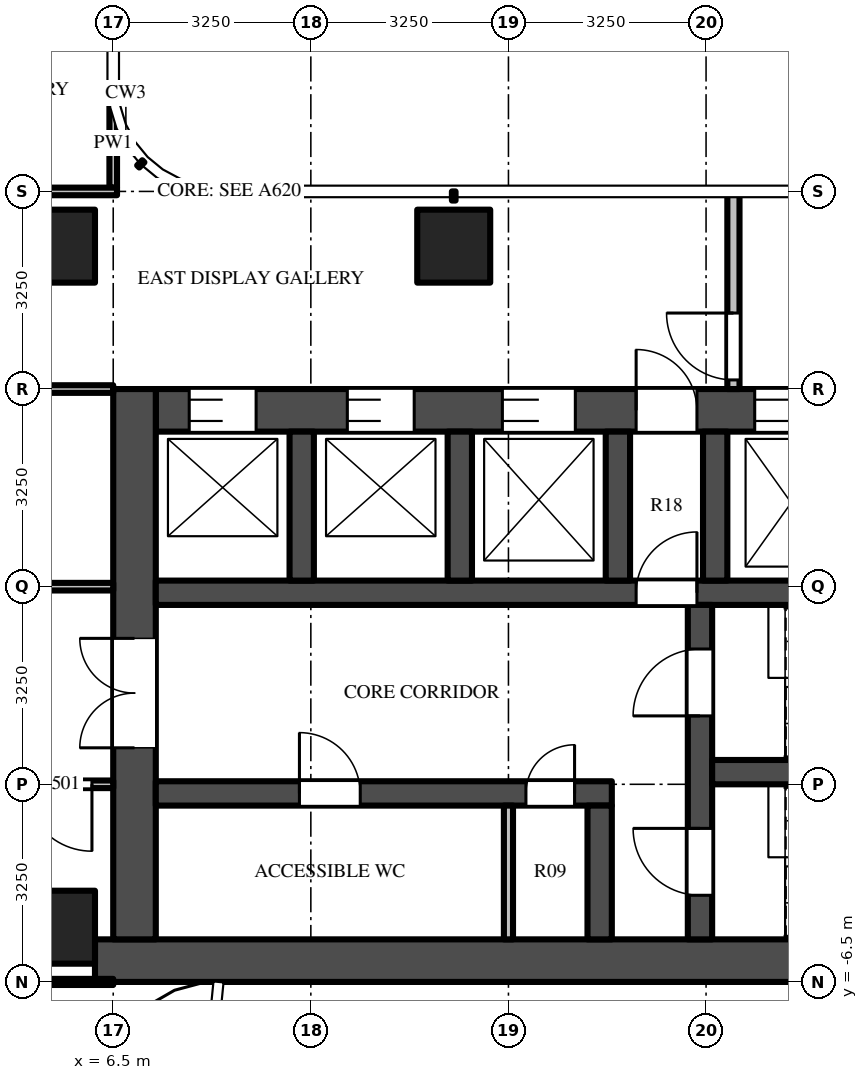
"""IFC4 building model, lengths in metres.
Left out: names, types, materials, properties, quantities, classifications, styles, units other than length and angle.
Written with IfcOpenShell. Run it as: python <this file> out.ifc"""

import sys

from ifc_helpers import new_model, si_unit, direction, frame, frame_2d, origin, origin_2d, place, context, subcontext, project, spatial, rectangle, extrude, source, transform, mapped, element, fill, save


model = new_model("IFC4")
c1 = context("Model", 3, precision=1e-05, world=origin(), true_north=direction((0.0, 1.0)))
c2 = subcontext(c1, "Body", "Model", "MODEL_VIEW")
j1 = project(units=[si_unit("LENGTHUNIT", "METRE"), si_unit("PLANEANGLEUNIT", "RADIAN")], contexts=[c1])
p1 = place(None, origin())
s1 = spatial("IfcSite", under=j1, at=p1, CompositionType="ELEMENT")
p2 = place(p1, origin())
s2 = spatial("IfcBuilding", under=s1, at=p2, CompositionType="ELEMENT")
p3 = place(p2, frame((0.0, 0.0, 165.9)))
s3 = spatial("IfcBuildingStorey", under=s2, at=p3, CompositionType="ELEMENT", Elevation=165.9)
m1 = source(origin(), c2, "Body", "SweptSolid", [
    extrude(rectangle(XDim=1.2, YDim=1.2, at=origin_2d()), origin(), (0.0, 0.0, 1.0), 3.9),
])
for number, where, z_axis, x_axis in (
    (1, (12.1, 5.6, 0.0), (0.0, 0.0, 1.0), (1.0, 0.0, 0.0)),
    (2, (5.6, 5.6, 0.0), (0.0, 0.0, 1.0), (1.0, 0.0, 0.0)),
    (3, (5.6, -5.6, 0.0), (0.0, 0.0, 1.0), (1.0, 0.0, 0.0)),
):
    element("IfcColumn", number, at=place(p3, frame(where, z_axis=z_axis, x_axis=x_axis)), inside=s3, PredefinedType="COLUMN", context=c2, shape_type="MappedRepresentation", body=[
        mapped(m1, transform((0.0, 0.0, 0.0))),
    ])
m2 = source(origin(), c2, "Body", "SweptSolid", [
    extrude(rectangle(XDim=16.55, YDim=0.7, at=frame_2d((8.275, 0.0))), origin(), (0.0, 0.0, 1.0), 3.7),
])
p4 = place(p3, frame((6.2, -6.15, 0.0), z_axis=(0.0, 0.0, 1.0), x_axis=(1.0, 0.0, 0.0)))
e4 = element("IfcWall", 4, at=p4, inside=s3, PredefinedType="SHEAR", context=c2, shape_type="MappedRepresentation", body=[
    mapped(m2, transform((0.0, 0.0, 0.0))),
])
m3 = source(origin(), c2, "Body", "SweptSolid", [
    extrude(rectangle(XDim=14.85, YDim=0.7, at=frame_2d((7.425, 0.0))), origin(), (0.0, 0.0, 1.0), 3.7),
])
p5 = place(p3, frame((7.2, 2.9, 0.0), z_axis=(0.0, 0.0, 1.0), x_axis=(1.0, 0.0, 0.0)))
e5 = element("IfcWall", 5, at=p5, inside=s3, PredefinedType="SHEAR", context=c2, shape_type="MappedRepresentation", body=[
    mapped(m3, transform((0.0, 0.0, 0.0))),
])
m4 = source(origin(), c2, "Body", "SweptSolid", [
    extrude(rectangle(XDim=1.1, YDim=2.1, at=frame_2d((0.55, 1.05))), frame((0.0, 0.36, 0.0), z_axis=(0.0, -1.0, 0.0), x_axis=(1.0, 0.0, 0.0)), (0.0, 0.0, 1.0), 0.72),
])
p6 = place(p5, frame((0.55, 0.0, 0.0)))
e6 = element("IfcOpeningElement", 6, at=p6, cuts=e5, PredefinedType="OPENING", context=c2, shape_type="MappedRepresentation", body=[
    mapped(m4, transform((0.0, 0.0, 0.0))),
])
p7 = place(p5, frame((3.15, 0.0, 0.0)))
e7 = element("IfcOpeningElement", 7, at=p7, cuts=e5, PredefinedType="OPENING", context=c2, shape_type="MappedRepresentation", body=[
    mapped(m4, transform((0.0, 0.0, 0.0))),
])
m5 = source(origin(), c2, "Body", "SweptSolid", [
    extrude(rectangle(XDim=1.2, YDim=2.1, at=frame_2d((0.6, 1.05))), frame((0.0, 0.36, 0.0), z_axis=(0.0, -1.0, 0.0), x_axis=(1.0, 0.0, 0.0)), (0.0, 0.0, 1.0), 0.72),
])
p8 = place(p5, frame((5.7, 0.0, 0.0)))
e8 = element("IfcOpeningElement", 8, at=p8, cuts=e5, PredefinedType="OPENING", context=c2, shape_type="MappedRepresentation", body=[
    mapped(m5, transform((0.0, 0.0, 0.0))),
])
m6 = source(origin(), c2, "Body", "SweptSolid", [
    extrude(rectangle(XDim=1.3, YDim=2.1, at=frame_2d((0.65, 1.05))), frame((0.0, 0.36, 0.0), z_axis=(0.0, -1.0, 0.0), x_axis=(1.0, 0.0, 0.0)), (0.0, 0.0, 1.0), 0.72),
])
p9 = place(p5, frame((12.2, 0.0, 0.0)))
e9 = element("IfcOpeningElement", 9, at=p9, cuts=e5, PredefinedType="OPENING", context=c2, shape_type="MappedRepresentation", body=[
    mapped(m6, transform((0.0, 0.0, 0.0))),
])
p10 = place(p5, frame((9.85, 0.0, 0.0)))
e10 = element("IfcOpeningElement", 10, at=p10, cuts=e5, PredefinedType="OPENING", context=c2, shape_type="MappedRepresentation", body=[
    mapped(m5, transform((0.0, 0.0, 0.0))),
])
m7 = source(origin(), c2, "Body", "SweptSolid", [
    extrude(rectangle(XDim=1.0, YDim=2.1, at=frame_2d((0.5, 1.05))), frame((0.0, 0.36, 0.0), z_axis=(0.0, -1.0, 0.0), x_axis=(1.0, 0.0, 0.0)), (0.0, 0.0, 1.0), 0.72),
])
p11 = place(p5, frame((7.9, 0.0, 0.0)))
e11 = element("IfcOpeningElement", 11, at=p11, cuts=e5, PredefinedType="OPENING", context=c2, shape_type="MappedRepresentation", body=[
    mapped(m7, transform((0.0, 0.0, 0.0))),
])
m8 = source(origin(), c2, "Body", "SweptSolid", [
    extrude(rectangle(XDim=9.05, YDim=0.7, at=frame_2d((4.525, 0.0))), origin(), (0.0, 0.0, 1.0), 3.7),
])
p12 = place(p3, frame((6.85, -5.8, 0.0), z_axis=(0.0, 0.0, 1.0), x_axis=(0.0, 1.0, 0.0)))
e12 = element("IfcWall", 12, at=p12, inside=s3, PredefinedType="SHEAR", context=c2, shape_type="MappedRepresentation", body=[
    mapped(m8, transform((0.0, 0.0, 0.0))),
])
m9 = source(origin(), c2, "Body", "SweptSolid", [
    extrude(rectangle(XDim=1.8, YDim=2.1, at=frame_2d((0.9, 1.05))), frame((0.0, 0.36, 0.0), z_axis=(0.0, -1.0, 0.0), x_axis=(1.0, 0.0, 0.0)), (0.0, 0.0, 1.0), 0.72),
])
p13 = place(p12, frame((3.15, 0.0, 0.0)))
e13 = element("IfcOpeningElement", 13, at=p13, cuts=e12, PredefinedType="OPENING", context=c2, shape_type="MappedRepresentation", body=[
    mapped(m9, transform((0.0, 0.0, 0.0))),
])
m10 = source(origin(), c2, "Body", "SweptSolid", [
    extrude(rectangle(XDim=7.5, YDim=0.4, at=frame_2d((3.75, 0.0))), origin(), (0.0, 0.0, 1.0), 3.7),
])
p14 = place(p3, frame((7.2, -3.4, 0.0), z_axis=(0.0, 0.0, 1.0), x_axis=(1.0, 0.0, 0.0)))
e14 = element("IfcWall", 14, at=p14, inside=s3, PredefinedType="SHEAR", context=c2, shape_type="MappedRepresentation", body=[
    mapped(m10, transform((0.0, 0.0, 0.0))),
])
m11 = source(origin(), c2, "Body", "SweptSolid", [
    extrude(rectangle(XDim=1.0, YDim=2.1, at=frame_2d((0.5, 1.05))), frame((0.0, 0.21, 0.0), z_axis=(0.0, -1.0, 0.0), x_axis=(1.0, 0.0, 0.0)), (0.0, 0.0, 1.0), 0.42),
])
p15 = place(p14, frame((2.363, 0.0, 0.0)))
e15 = element("IfcOpeningElement", 15, at=p15, cuts=e14, PredefinedType="OPENING", context=c2, shape_type="MappedRepresentation", body=[
    mapped(m11, transform((0.0, 0.0, 0.0))),
])
m12 = source(origin(), c2, "Body", "SweptSolid", [
    extrude(rectangle(XDim=0.8, YDim=2.1, at=frame_2d((0.4, 1.05))), frame((0.0, 0.21, 0.0), z_axis=(0.0, -1.0, 0.0), x_axis=(1.0, 0.0, 0.0)), (0.0, 0.0, 1.0), 0.42),
])
p16 = place(p14, frame((6.087, 0.0, 0.0)))
e16 = element("IfcOpeningElement", 16, at=p16, cuts=e14, PredefinedType="OPENING", context=c2, shape_type="MappedRepresentation", body=[
    mapped(m12, transform((0.0, 0.0, 0.0))),
])
m13 = source(origin(), c2, "Body", "SweptSolid", [
    extrude(rectangle(XDim=14.85, YDim=0.4, at=frame_2d((7.425, 0.0))), origin(), (0.0, 0.0, 1.0), 3.7),
])
p17 = place(p3, frame((7.2, -0.1, 0.0), z_axis=(0.0, 0.0, 1.0), x_axis=(1.0, 0.0, 0.0)))
e17 = element("IfcWall", 17, at=p17, inside=s3, PredefinedType="SHEAR", context=c2, shape_type="MappedRepresentation", body=[
    mapped(m13, transform((0.0, 0.0, 0.0))),
])
p18 = place(p17, frame((7.9, 0.0, 0.0)))
e18 = element("IfcOpeningElement", 18, at=p18, cuts=e17, PredefinedType="OPENING", context=c2, shape_type="MappedRepresentation", body=[
    mapped(m11, transform((0.0, 0.0, 0.0))),
])
m14 = source(origin(), c2, "Body", "SweptSolid", [
    extrude(rectangle(XDim=5.5, YDim=0.4, at=frame_2d((2.75, 0.0))), origin(), (0.0, 0.0, 1.0), 3.7),
])
p19 = place(p3, frame((16.15, -5.8, 0.0), z_axis=(0.0, 0.0, 1.0), x_axis=(0.0, 1.0, 0.0)))
e19 = element("IfcWall", 19, at=p19, inside=s3, PredefinedType="SHEAR", context=c2, shape_type="MappedRepresentation", body=[
    mapped(m14, transform((0.0, 0.0, 0.0))),
])
m15 = source(origin(), c2, "Body", "SweptSolid", [
    extrude(rectangle(XDim=1.1, YDim=2.1, at=frame_2d((0.55, 1.05))), frame((0.0, 0.21, 0.0), z_axis=(0.0, -1.0, 0.0), x_axis=(1.0, 0.0, 0.0)), (0.0, 0.0, 1.0), 0.42),
])
p20 = place(p19, frame((0.725, 0.0, 0.0)))
e20 = element("IfcOpeningElement", 20, at=p20, cuts=e19, PredefinedType="OPENING", context=c2, shape_type="MappedRepresentation", body=[
    mapped(m15, transform((0.0, 0.0, 0.0))),
])
p21 = place(p19, frame((3.675, 0.0, 0.0)))
e21 = element("IfcOpeningElement", 21, at=p21, cuts=e19, PredefinedType="OPENING", context=c2, shape_type="MappedRepresentation", body=[
    mapped(m15, transform((0.0, 0.0, 0.0))),
])
m16 = source(origin(), c2, "Body", "SweptSolid", [
    extrude(rectangle(XDim=5.7, YDim=0.4, at=frame_2d((2.85, 0.0))), origin(), (0.0, 0.0, 1.0), 3.7),
])
p22 = place(p3, frame((16.35, -3.05, 0.0), z_axis=(0.0, 0.0, 1.0), x_axis=(1.0, 0.0, 0.0)))
e22 = element("IfcWall", 22, at=p22, inside=s3, PredefinedType="SHEAR", context=c2, shape_type="MappedRepresentation", body=[
    mapped(m16, transform((0.0, 0.0, 0.0))),
])
m17 = source(origin(), c2, "Body", "SweptSolid", [
    extrude(rectangle(XDim=2.2, YDim=0.4, at=frame_2d((1.1, 0.0))), origin(), (0.0, 0.0, 1.0), 3.7),
])
p23 = place(p3, frame((14.5, -5.8, 0.0), z_axis=(0.0, 0.0, 1.0), x_axis=(0.0, 1.0, 0.0)))
e23 = element("IfcWall", 23, at=p23, inside=s3, PredefinedType="SHEAR", context=c2, shape_type="MappedRepresentation", body=[
    mapped(m17, transform((0.0, 0.0, 0.0))),
])
m18 = source(origin(), c2, "Body", "SweptSolid", [
    extrude(rectangle(XDim=2.45, YDim=0.4, at=frame_2d((1.225, 0.0))), origin(), (0.0, 0.0, 1.0), 3.7),
])
for number, where, z_axis, x_axis in (
    (24, (9.6, 0.1, 0.0), (0.0, 0.0, 1.0), (0.0, 1.0, 0.0)),
    (25, (12.2, 0.1, 0.0), (0.0, 0.0, 1.0), (0.0, 1.0, 0.0)),
    (26, (14.8, 0.1, 0.0), (0.0, 0.0, 1.0), (0.0, 1.0, 0.0)),
    (27, (16.4, 0.1, 0.0), (0.0, 0.0, 1.0), (0.0, 1.0, 0.0)),
):
    element("IfcWall", number, at=place(p3, frame(where, z_axis=z_axis, x_axis=x_axis)), inside=s3, PredefinedType="SHEAR", context=c2, shape_type="MappedRepresentation", body=[
        mapped(m18, transform((0.0, 0.0, 0.0))),
    ])
m19 = source(origin(), c2, "Body", "SweptSolid", [
    extrude(rectangle(XDim=3.25, YDim=0.2, at=frame_2d((1.625, 0.0))), origin(), (0.0, 0.0, 1.0), 3.7),
])
p24 = place(p3, frame((16.7, 3.25, 0.0), z_axis=(0.0, 0.0, 1.0), x_axis=(0.0, 1.0, 0.0)))
e28 = element("IfcWall", 28, at=p24, inside=s3, PredefinedType="PARTITIONING", context=c2, shape_type="MappedRepresentation", body=[
    mapped(m19, transform((0.0, 0.0, 0.0))),
])
m20 = source(origin(), c2, "Body", "SweptSolid", [
    extrude(rectangle(XDim=1.1, YDim=2.1, at=frame_2d((0.55, 1.05))), frame((0.0, 0.11, 0.0), z_axis=(0.0, -1.0, 0.0), x_axis=(1.0, 0.0, 0.0)), (0.0, 0.0, 1.0), 0.22),
])
p25 = place(p24, frame((0.15, 0.0, 0.0)))
e29 = element("IfcOpeningElement", 29, at=p25, cuts=e28, PredefinedType="OPENING", context=c2, shape_type="MappedRepresentation", body=[
    mapped(m20, transform((0.0, 0.0, 0.0))),
])
m21 = source(origin(), c2, "Body", "SweptSolid", [
    extrude(rectangle(XDim=2.2, YDim=0.15, at=frame_2d((1.1, 0.0))), origin(), (0.0, 0.0, 1.0), 3.7),
])
p26 = place(p3, frame((13.0, -5.8, 0.0), z_axis=(0.0, 0.0, 1.0), x_axis=(0.0, 1.0, 0.0)))
e30 = element("IfcWall", 30, at=p26, inside=s3, PredefinedType="PARTITIONING", context=c2, shape_type="MappedRepresentation", body=[
    mapped(m21, transform((0.0, 0.0, 0.0))),
])
m22 = source(origin(), c2, "Body", "SweptSolid", [
    extrude(rectangle(XDim=1.469, YDim=0.125, at=frame_2d((0.734, 0.0))), origin(), (0.0, 0.0, 1.0), 3.7),
])
p27 = place(p3, frame((6.5, 6.562, 0.0), z_axis=(0.0, 0.0, 1.0), x_axis=(0.0, 1.0, 0.0)))
e31 = element("IfcWall", 31, at=p27, inside=s3, PredefinedType="PARTITIONING", context=c2, shape_type="MappedRepresentation", body=[
    mapped(m22, transform((0.0, 0.0, 0.0))),
])
m23 = source(origin(), c2, "Body", "SweptSolid", [
    extrude(rectangle(XDim=5.363, YDim=0.1, at=frame_2d((2.681, 0.0))), origin(), (0.0, 0.0, 1.0), 2.78),
])
p28 = place(p3, frame((1.137, -6.5, 0.0), z_axis=(0.0, 0.0, 1.0), x_axis=(1.0, 0.0, 0.0)))
e32 = element("IfcWall", 32, at=p28, inside=s3, PredefinedType="PARTITIONING", context=c2, shape_type="MappedRepresentation", body=[
    mapped(m23, transform((0.0, 0.0, 0.0))),
])
m24 = source(origin(), c2, "Body", "SweptSolid", [
    extrude(rectangle(XDim=5.363, YDim=0.125, at=frame_2d((2.681, 0.0))), origin(), (0.0, 0.0, 1.0), 2.997),
])
p29 = place(p3, frame((6.5, -3.25, 0.0), z_axis=(0.0, 0.0, 1.0), x_axis=(-1.0, 0.0, 0.0)))
e33 = element("IfcWall", 33, at=p29, inside=s3, PredefinedType="PARTITIONING", context=c2, shape_type="MappedRepresentation", body=[
    mapped(m24, transform((0.0, 0.0, 0.0))),
])
m25 = source(origin(), c2, "Body", "SweptSolid", [
    extrude(rectangle(XDim=1.1, YDim=2.1, at=frame_2d((0.55, 1.05))), frame((0.0, 0.073, 0.0), z_axis=(0.0, -1.0, 0.0), x_axis=(1.0, 0.0, 0.0)), (0.0, 0.0, 1.0), 0.145),
])
p30 = place(p29, frame((0.35, 0.0, 0.0)))
e34 = element("IfcOpeningElement", 34, at=p30, cuts=e33, PredefinedType="OPENING", context=c2, shape_type="MappedRepresentation", body=[
    mapped(m25, transform((0.0, 0.0, 0.0))),
])
p31 = place(p3, frame((6.5, 0.0, 0.0), z_axis=(0.0, 0.0, 1.0), x_axis=(-1.0, 0.0, 0.0)))
e35 = element("IfcWall", 35, at=p31, inside=s3, PredefinedType="PARTITIONING", context=c2, shape_type="MappedRepresentation", body=[
    mapped(m24, transform((0.0, 0.0, 0.0))),
])
m26 = source(origin(), c2, "Body", "SweptSolid", [
    extrude(rectangle(XDim=1.0, YDim=2.1, at=frame_2d((0.5, 1.05))), frame((0.0, 0.073, 0.0), z_axis=(0.0, -1.0, 0.0), x_axis=(1.0, 0.0, 0.0)), (0.0, 0.0, 1.0), 0.145),
])
p32 = place(p31, frame((3.95, 0.0, 0.0)))
e36 = element("IfcOpeningElement", 36, at=p32, cuts=e35, PredefinedType="OPENING", context=c2, shape_type="MappedRepresentation", body=[
    mapped(m26, transform((0.0, 0.0, 0.0))),
])
p33 = place(p3, frame((1.137, 3.25, 0.0), z_axis=(0.0, 0.0, 1.0), x_axis=(1.0, 0.0, 0.0)))
e37 = element("IfcWall", 37, at=p33, inside=s3, PredefinedType="PARTITIONING", context=c2, shape_type="MappedRepresentation", body=[
    mapped(m24, transform((0.0, 0.0, 0.0))),
])
m27 = source(origin(), c2, "Body", "SweptSolid", [
    extrude(rectangle(XDim=3.725, YDim=0.125, at=frame_2d((1.863, 0.0))), origin(), (0.0, 0.0, 1.0), 2.78),
])
p34 = place(p3, frame((2.837, 6.5, 0.0), z_axis=(0.0, 0.0, 1.0), x_axis=(1.0, 0.0, 0.0)))
e38 = element("IfcWall", 38, at=p34, inside=s3, PredefinedType="PARTITIONING", context=c2, shape_type="MappedRepresentation", body=[
    mapped(m27, transform((0.0, 0.0, 0.0))),
])
m28 = source(origin(), c2, "Body", "SweptSolid", [
    extrude(rectangle(XDim=1.1, YDim=2.1, at=frame_2d((0.55, 1.05))), frame((0.0, -0.275, 0.0), z_axis=(0.0, -1.0, 0.0), x_axis=(1.0, 0.0, 0.0)), (0.0, 0.0, 1.0), 0.05),
])
p35 = place(p6, origin())
e39 = element("IfcDoor", 39, at=p35, inside=s3, OperationType="DOUBLE_DOOR_SLIDING", PredefinedType="DOOR", context=c2, shape_type="MappedRepresentation", body=[
    mapped(m28, transform((0.0, 0.0, 0.0))),
])
fill(e6, e39)
p36 = place(p7, origin())
e40 = element("IfcDoor", 40, at=p36, inside=s3, OperationType="DOUBLE_DOOR_SLIDING", PredefinedType="DOOR", context=c2, shape_type="MappedRepresentation", body=[
    mapped(m28, transform((0.0, 0.0, 0.0))),
])
fill(e7, e40)
m29 = source(origin(), c2, "Body", "SweptSolid", [
    extrude(rectangle(XDim=1.2, YDim=2.1, at=frame_2d((0.6, 1.05))), frame((0.0, -0.275, 0.0), z_axis=(0.0, -1.0, 0.0), x_axis=(1.0, 0.0, 0.0)), (0.0, 0.0, 1.0), 0.05),
])
p37 = place(p8, origin())
e41 = element("IfcDoor", 41, at=p37, inside=s3, OperationType="DOUBLE_DOOR_SLIDING", PredefinedType="DOOR", context=c2, shape_type="MappedRepresentation", body=[
    mapped(m29, transform((0.0, 0.0, 0.0))),
])
fill(e8, e41)
p38 = place(p10, origin())
e42 = element("IfcDoor", 42, at=p38, inside=s3, OperationType="DOUBLE_DOOR_SLIDING", PredefinedType="DOOR", context=c2, shape_type="MappedRepresentation", body=[
    mapped(m29, transform((0.0, 0.0, 0.0))),
])
fill(e10, e42)
m30 = source(origin(), c2, "Body", "SweptSolid", [
    extrude(rectangle(XDim=1.8, YDim=2.1, at=frame_2d((0.9, 1.05))), frame((0.0, -0.275, 0.0), z_axis=(0.0, -1.0, 0.0), x_axis=(1.0, 0.0, 0.0)), (0.0, 0.0, 1.0), 0.05),
])
p39 = place(p13, origin())
e43 = element("IfcDoor", 43, at=p39, inside=s3, OperationType="DOUBLE_DOOR_SINGLE_SWING", PredefinedType="DOOR", context=c2, shape_type="MappedRepresentation", body=[
    mapped(m30, transform((0.0, 0.0, 0.0))),
])
fill(e13, e43)
m31 = source(origin(), c2, "Body", "SweptSolid", [
    extrude(rectangle(XDim=1.1, YDim=2.1, at=frame_2d((0.55, 1.05))), frame((0.0, 0.025, 0.0), z_axis=(0.0, -1.0, 0.0), x_axis=(1.0, 0.0, 0.0)), (0.0, 0.0, 1.0), 0.05),
])
p40 = place(p20, origin())
e44 = element("IfcDoor", 44, at=p40, inside=s3, OperationType="SINGLE_SWING_RIGHT", PredefinedType="DOOR", context=c2, shape_type="MappedRepresentation", body=[
    mapped(m31, transform((0.0, 0.0, 0.0))),
])
fill(e20, e44)
p41 = place(p21, origin())
e45 = element("IfcDoor", 45, at=p41, inside=s3, OperationType="SINGLE_SWING_LEFT", PredefinedType="DOOR", context=c2, shape_type="MappedRepresentation", body=[
    mapped(m31, transform((0.0, 0.0, 0.0))),
])
fill(e21, e45)
m32 = source(origin(), c2, "Body", "SweptSolid", [
    extrude(rectangle(XDim=1.0, YDim=2.1, at=frame_2d((0.5, 1.05))), frame((0.0, 0.025, 0.0), z_axis=(0.0, -1.0, 0.0), x_axis=(1.0, 0.0, 0.0)), (0.0, 0.0, 1.0), 0.05),
])
p42 = place(p18, origin())
e46 = element("IfcDoor", 46, at=p42, inside=s3, OperationType="SINGLE_SWING_RIGHT", PredefinedType="DOOR", context=c2, shape_type="MappedRepresentation", body=[
    mapped(m32, transform((0.0, 0.0, 0.0))),
])
fill(e18, e46)
m33 = source(origin(), c2, "Body", "SweptSolid", [
    extrude(rectangle(XDim=1.0, YDim=2.1, at=frame_2d((0.5, 1.05))), frame((0.0, -0.275, 0.0), z_axis=(0.0, -1.0, 0.0), x_axis=(1.0, 0.0, 0.0)), (0.0, 0.0, 1.0), 0.05),
])
p43 = place(p11, origin())
e47 = element("IfcDoor", 47, at=p43, inside=s3, OperationType="SINGLE_SWING_LEFT", PredefinedType="DOOR", context=c2, shape_type="MappedRepresentation", body=[
    mapped(m33, transform((0.0, 0.0, 0.0))),
])
fill(e11, e47)
p44 = place(p25, origin())
e48 = element("IfcDoor", 48, at=p44, inside=s3, OperationType="SINGLE_SWING_RIGHT", PredefinedType="DOOR", context=c2, shape_type="MappedRepresentation", body=[
    mapped(m31, transform((0.0, 0.0, 0.0))),
])
fill(e29, e48)
p45 = place(p15, origin())
e49 = element("IfcDoor", 49, at=p45, inside=s3, OperationType="SINGLE_SWING_LEFT", PredefinedType="DOOR", context=c2, shape_type="MappedRepresentation", body=[
    mapped(m32, transform((0.0, 0.0, 0.0))),
])
fill(e15, e49)
m34 = source(origin(), c2, "Body", "SweptSolid", [
    extrude(rectangle(XDim=0.8, YDim=2.1, at=frame_2d((0.4, 1.05))), frame((0.0, 0.025, 0.0), z_axis=(0.0, -1.0, 0.0), x_axis=(1.0, 0.0, 0.0)), (0.0, 0.0, 1.0), 0.05),
])
p46 = place(p16, origin())
e50 = element("IfcDoor", 50, at=p46, inside=s3, OperationType="SINGLE_SWING_RIGHT", PredefinedType="DOOR", context=c2, shape_type="MappedRepresentation", body=[
    mapped(m34, transform((0.0, 0.0, 0.0))),
])
fill(e16, e50)
p47 = place(p30, origin())
e51 = element("IfcDoor", 51, at=p47, inside=s3, OperationType="SINGLE_SWING_LEFT", PredefinedType="DOOR", context=c2, shape_type="MappedRepresentation", body=[
    mapped(m31, transform((0.0, 0.0, 0.0))),
])
fill(e34, e51)
save(model, sys.argv[1])
